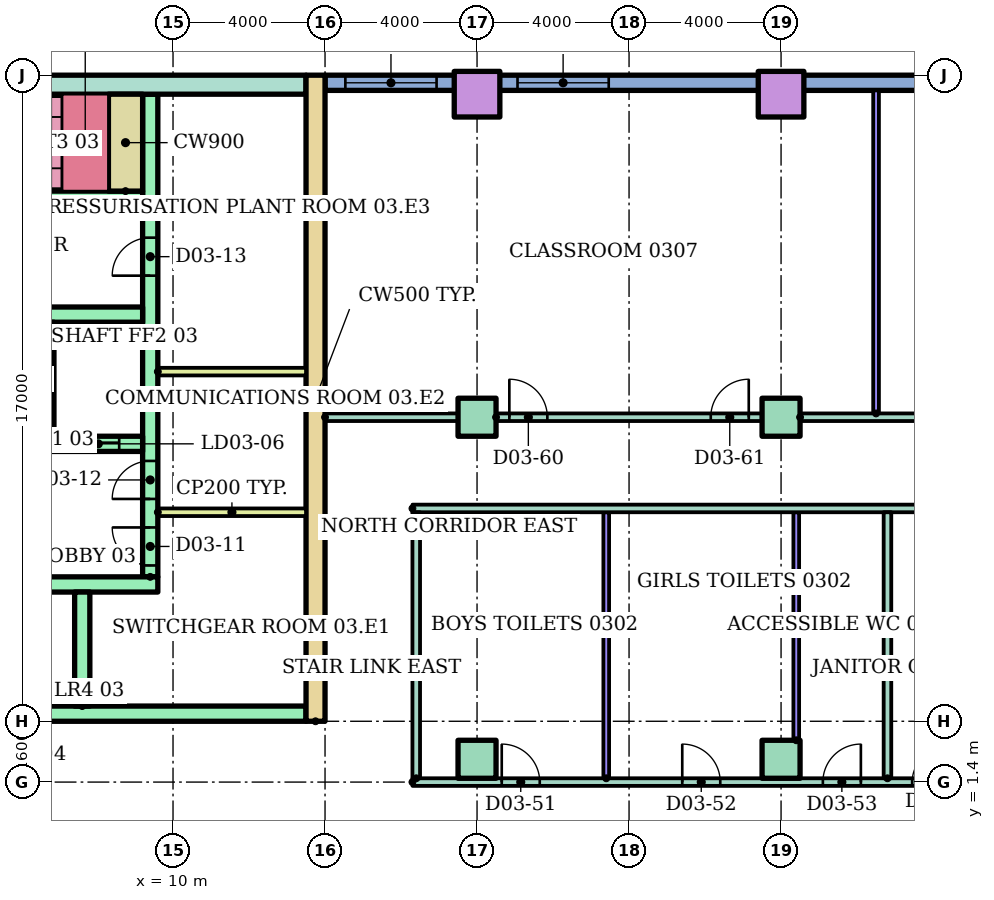
"""IFC4 building model, lengths in metres.
Left out: names, types, materials, properties, quantities, classifications, styles, units other than length and angle.
Written with IfcOpenShell. Run it as: python <this file> out.ifc"""

import sys

from ifc_helpers import new_model, si_unit, direction, frame, frame_2d, origin, origin_2d, place, context, subcontext, project, spatial, rectangle, hollow_rectangle, extrude, element, fill, save


model = new_model("IFC4")
c1 = context("Model", 3, precision=1e-05, world=origin(), true_north=direction((0.0, 1.0)))
c2 = subcontext(c1, "Body", "Model", "MODEL_VIEW")
j1 = project(units=[si_unit("LENGTHUNIT", "METRE"), si_unit("PLANEANGLEUNIT", "RADIAN")], contexts=[c1])
p1 = place(None, origin())
s1 = spatial("IfcSite", under=j1, at=p1, CompositionType="ELEMENT")
p2 = place(p1, origin())
s2 = spatial("IfcBuilding", under=s1, at=p2, CompositionType="ELEMENT")
p3 = place(p2, frame((0.0, 0.0, 14.0)))
s3 = spatial("IfcBuildingStorey", under=s2, at=p3, CompositionType="ELEMENT", Elevation=14.0)
for number, where in (
    (1, (18.0, 2.0, 0.0)),
    (2, (26.0, 2.0, 0.0)),
    (3, (18.0, 11.0, 0.0)),
    (4, (26.0, 11.0, 0.0)),
):
    element("IfcColumn", number, at=place(p3, frame(where)), inside=s3, PredefinedType="COLUMN", context=c2, shape_type="SweptSolid", body=[
        extrude(rectangle(XDim=1.0, YDim=1.0, at=origin_2d()), origin(), (0.0, 0.0, 1.0), 4.0),
    ])
for number, where in (
    (5, (18.0, 19.5, 0.0)),
    (6, (26.0, 19.5, 0.0)),
):
    element("IfcColumn", number, at=place(p3, frame(where)), inside=s3, PredefinedType="COLUMN", context=c2, shape_type="SweptSolid", body=[
        extrude(hollow_rectangle(XDim=1.2, YDim=1.2, WallThickness=0.06, at=origin_2d()), origin(), (0.0, 0.0, 1.0), 4.0),
    ])
p4 = place(p3, frame((39.6, 19.8, 0.0), z_axis=(0.0, 0.0, 1.0), x_axis=(-1.0, 0.0, 0.0)))
e7 = element("IfcWall", 7, at=p4, inside=s3, PredefinedType="STANDARD", context=c2, shape_type="SweptSolid", body=[
    extrude(rectangle(XDim=25.6, YDim=0.4, at=frame_2d((12.8, 0.0))), origin(), (0.0, 0.0, 1.0), 3.7),
])
p5 = place(p4, frame((2.4, 0.0, 0.9)))
e8 = element("IfcOpeningElement", 8, at=p5, cuts=e7, PredefinedType="OPENING", context=c2, shape_type="SweptSolid", body=[
    extrude(rectangle(XDim=2.4, YDim=2.1, at=frame_2d((1.2, 1.05))), frame((0.0, 0.21, 0.0), z_axis=(0.0, -1.0, 0.0), x_axis=(1.0, 0.0, 0.0)), (0.0, 0.0, 1.0), 0.42),
])
p6 = place(p4, frame((18.135, 0.0, 0.9)))
e9 = element("IfcOpeningElement", 9, at=p6, cuts=e7, PredefinedType="OPENING", context=c2, shape_type="SweptSolid", body=[
    extrude(rectangle(XDim=2.4, YDim=2.1, at=frame_2d((1.2, 1.05))), frame((0.0, 0.21, 0.0), z_axis=(0.0, -1.0, 0.0), x_axis=(1.0, 0.0, 0.0)), (0.0, 0.0, 1.0), 0.42),
])
p7 = place(p4, frame((22.665, 0.0, 0.9)))
e10 = element("IfcOpeningElement", 10, at=p7, cuts=e7, PredefinedType="OPENING", context=c2, shape_type="SweptSolid", body=[
    extrude(rectangle(XDim=2.4, YDim=2.1, at=frame_2d((1.2, 1.05))), frame((0.0, 0.21, 0.0), z_axis=(0.0, -1.0, 0.0), x_axis=(1.0, 0.0, 0.0)), (0.0, 0.0, 1.0), 0.42),
])
p8 = place(p3, frame((13.75, 3.0, 0.0), z_axis=(0.0, 0.0, 1.0), x_axis=(0.0, 1.0, 0.0)))
e11 = element("IfcWall", 11, at=p8, inside=s3, PredefinedType="SHEAR", context=c2, shape_type="SweptSolid", body=[
    extrude(rectangle(XDim=17.0, YDim=0.5, at=frame_2d((8.5, 0.0))), origin(), (0.0, 0.0, 1.0), 3.7),
])
p9 = place(p3, frame((-13.5, 19.75, 0.0)))
e12 = element("IfcWall", 12, at=p9, inside=s3, PredefinedType="SHEAR", context=c2, shape_type="SweptSolid", body=[
    extrude(rectangle(XDim=27.0, YDim=0.5, at=frame_2d((13.5, 0.0))), origin(), (0.0, 0.0, 1.0), 3.7),
])
p10 = place(p3, frame((9.4, 6.8, 0.0), z_axis=(0.0, 0.0, 1.0), x_axis=(0.0, 1.0, 0.0)))
e13 = element("IfcWall", 13, at=p10, inside=s3, PredefinedType="SHEAR", context=c2, shape_type="SweptSolid", body=[
    extrude(rectangle(XDim=12.7, YDim=0.4, at=frame_2d((6.35, 0.0))), origin(), (0.0, 0.0, 1.0), 3.7),
])
p11 = place(p10, frame((0.3, 0.0, 0.0)))
e14 = element("IfcOpeningElement", 14, at=p11, cuts=e13, PredefinedType="OPENING", context=c2, shape_type="SweptSolid", body=[
    extrude(rectangle(XDim=1.0, YDim=2.1, at=frame_2d((0.5, 1.05))), frame((0.0, 0.21, 0.0), z_axis=(0.0, -1.0, 0.0), x_axis=(1.0, 0.0, 0.0)), (0.0, 0.0, 1.0), 0.42),
])
p12 = place(p10, frame((2.05, 0.0, 0.0)))
e15 = element("IfcOpeningElement", 15, at=p12, cuts=e13, PredefinedType="OPENING", context=c2, shape_type="SweptSolid", body=[
    extrude(rectangle(XDim=1.0, YDim=2.1, at=frame_2d((0.5, 1.05))), frame((0.0, 0.21, 0.0), z_axis=(0.0, -1.0, 0.0), x_axis=(1.0, 0.0, 0.0)), (0.0, 0.0, 1.0), 0.42),
])
p13 = place(p10, frame((7.925, 0.0, 0.0)))
e16 = element("IfcOpeningElement", 16, at=p13, cuts=e13, PredefinedType="OPENING", context=c2, shape_type="SweptSolid", body=[
    extrude(rectangle(XDim=1.0, YDim=2.1, at=frame_2d((0.5, 1.05))), frame((0.0, 0.21, 0.0), z_axis=(0.0, -1.0, 0.0), x_axis=(1.0, 0.0, 0.0)), (0.0, 0.0, 1.0), 0.42),
])
p14 = place(p3, frame((-13.5, 3.2, 0.0)))
e17 = element("IfcWall", 17, at=p14, inside=s3, PredefinedType="SHEAR", context=c2, shape_type="SweptSolid", body=[
    extrude(rectangle(XDim=27.0, YDim=0.4, at=frame_2d((13.5, 0.0))), origin(), (0.0, 0.0, 1.0), 3.7),
])
p15 = place(p14, frame((6.861, 0.0, 0.0)))
e18 = element("IfcOpeningElement", 18, at=p15, cuts=e17, PredefinedType="OPENING", context=c2, shape_type="SweptSolid", body=[
    extrude(rectangle(XDim=1.1, YDim=2.1, at=frame_2d((0.55, 1.05))), frame((0.0, 0.21, 0.0), z_axis=(0.0, -1.0, 0.0), x_axis=(1.0, 0.0, 0.0)), (0.0, 0.0, 1.0), 0.42),
])
p16 = place(p14, frame((9.906, 0.0, 0.0)))
e19 = element("IfcOpeningElement", 19, at=p16, cuts=e17, PredefinedType="OPENING", context=c2, shape_type="SweptSolid", body=[
    extrude(rectangle(XDim=1.1, YDim=2.1, at=frame_2d((0.55, 1.05))), frame((0.0, 0.21, 0.0), z_axis=(0.0, -1.0, 0.0), x_axis=(1.0, 0.0, 0.0)), (0.0, 0.0, 1.0), 0.42),
])
p17 = place(p14, frame((15.994, 0.0, 0.0)))
e20 = element("IfcOpeningElement", 20, at=p17, cuts=e17, PredefinedType="OPENING", context=c2, shape_type="SweptSolid", body=[
    extrude(rectangle(XDim=1.1, YDim=2.1, at=frame_2d((0.55, 1.05))), frame((0.0, 0.21, 0.0), z_axis=(0.0, -1.0, 0.0), x_axis=(1.0, 0.0, 0.0)), (0.0, 0.0, 1.0), 0.42),
])
p18 = place(p14, frame((19.039, 0.0, 0.0)))
e21 = element("IfcOpeningElement", 21, at=p18, cuts=e17, PredefinedType="OPENING", context=c2, shape_type="SweptSolid", body=[
    extrude(rectangle(XDim=1.1, YDim=2.1, at=frame_2d((0.55, 1.05))), frame((0.0, 0.21, 0.0), z_axis=(0.0, -1.0, 0.0), x_axis=(1.0, 0.0, 0.0)), (0.0, 0.0, 1.0), 0.42),
])
p19 = place(p14, frame((12.6, 0.0, 0.0)))
e22 = element("IfcOpeningElement", 22, at=p19, cuts=e17, PredefinedType="OPENING", context=c2, shape_type="SweptSolid", body=[
    extrude(rectangle(XDim=1.8, YDim=2.1, at=frame_2d((0.9, 1.05))), frame((0.0, 0.21, 0.0), z_axis=(0.0, -1.0, 0.0), x_axis=(1.0, 0.0, 0.0)), (0.0, 0.0, 1.0), 0.42),
])
p20 = place(p3, frame((1.522, 6.6, 0.0)))
e23 = element("IfcWall", 23, at=p20, inside=s3, PredefinedType="SHEAR", context=c2, shape_type="SweptSolid", body=[
    extrude(rectangle(XDim=8.078, YDim=0.4, at=frame_2d((4.039, 0.0))), origin(), (0.0, 0.0, 1.0), 3.7),
])
p21 = place(p3, frame((7.611, 3.4, 0.0), z_axis=(0.0, 0.0, 1.0), x_axis=(0.0, 1.0, 0.0)))
e24 = element("IfcWall", 24, at=p21, inside=s3, PredefinedType="SHEAR", context=c2, shape_type="SweptSolid", body=[
    extrude(rectangle(XDim=3.0, YDim=0.4, at=frame_2d((1.5, 0.0))), origin(), (0.0, 0.0, 1.0), 3.7),
])
p22 = place(p3, frame((1.2, 10.3, 0.0)))
e25 = element("IfcWall", 25, at=p22, inside=s3, PredefinedType="SHEAR", context=c2, shape_type="SweptSolid", body=[
    extrude(rectangle(XDim=8.0, YDim=0.4, at=frame_2d((4.0, 0.0))), origin(), (0.0, 0.0, 1.0), 3.7),
])
p23 = place(p22, frame((3.55, 0.0, 0.0)))
e26 = element("IfcOpeningElement", 26, at=p23, cuts=e25, PredefinedType="OPENING", context=c2, shape_type="SweptSolid", body=[
    extrude(rectangle(XDim=1.1, YDim=2.1, at=frame_2d((0.55, 1.05))), frame((0.0, 0.21, 0.0), z_axis=(0.0, -1.0, 0.0), x_axis=(1.0, 0.0, 0.0)), (0.0, 0.0, 1.0), 0.42),
])
p24 = place(p22, frame((6.283, 0.0, 0.0)))
e27 = element("IfcOpeningElement", 27, at=p24, cuts=e25, PredefinedType="OPENING", context=c2, shape_type="SweptSolid", body=[
    extrude(rectangle(XDim=1.1, YDim=2.1, at=frame_2d((0.55, 1.05))), frame((0.0, 0.21, 0.0), z_axis=(0.0, -1.0, 0.0), x_axis=(1.0, 0.0, 0.0)), (0.0, 0.0, 1.0), 0.42),
])
p25 = place(p22, frame((0.867, 0.0, 0.0)))
e28 = element("IfcOpeningElement", 28, at=p25, cuts=e25, PredefinedType="OPENING", context=c2, shape_type="SweptSolid", body=[
    extrude(rectangle(XDim=1.0, YDim=2.1, at=frame_2d((0.5, 1.05))), frame((0.0, 0.21, 0.0), z_axis=(0.0, -1.0, 0.0), x_axis=(1.0, 0.0, 0.0)), (0.0, 0.0, 1.0), 0.42),
])
p26 = place(p3, frame((1.2, 13.7, 0.0)))
e29 = element("IfcWall", 29, at=p26, inside=s3, PredefinedType="SHEAR", context=c2, shape_type="SweptSolid", body=[
    extrude(rectangle(XDim=8.0, YDim=0.4, at=frame_2d((4.0, 0.0))), origin(), (0.0, 0.0, 1.0), 3.7),
])
p27 = place(p3, frame((6.667, 10.5, 0.0), z_axis=(0.0, 0.0, 1.0), x_axis=(0.0, 1.0, 0.0)))
e30 = element("IfcWall", 30, at=p27, inside=s3, PredefinedType="SHEAR", context=c2, shape_type="SweptSolid", body=[
    extrude(rectangle(XDim=3.0, YDim=0.4, at=frame_2d((1.5, 0.0))), origin(), (0.0, 0.0, 1.0), 3.7),
])
p28 = place(p3, frame((-9.2, 16.75, 0.0)))
e31 = element("IfcWall", 31, at=p28, inside=s3, PredefinedType="SHEAR", context=c2, shape_type="SweptSolid", body=[
    extrude(rectangle(XDim=18.4, YDim=0.4, at=frame_2d((9.2, 0.0))), origin(), (0.0, 0.0, 1.0), 3.7),
])
p29 = place(p28, frame((0.1, 0.0, 0.0)))
e32 = element("IfcOpeningElement", 32, at=p29, cuts=e31, PredefinedType="OPENING", context=c2, shape_type="SweptSolid", body=[
    extrude(rectangle(XDim=0.95, YDim=2.1, at=frame_2d((0.475, 1.05))), frame((0.0, 0.21, 0.0), z_axis=(0.0, -1.0, 0.0), x_axis=(1.0, 0.0, 0.0)), (0.0, 0.0, 1.0), 0.42),
])
p30 = place(p28, frame((6.1, 0.0, 0.0)))
e33 = element("IfcOpeningElement", 33, at=p30, cuts=e31, PredefinedType="OPENING", context=c2, shape_type="SweptSolid", body=[
    extrude(rectangle(XDim=0.95, YDim=2.1, at=frame_2d((0.475, 1.05))), frame((0.0, 0.21, 0.0), z_axis=(0.0, -1.0, 0.0), x_axis=(1.0, 0.0, 0.0)), (0.0, 0.0, 1.0), 0.42),
])
p31 = place(p28, frame((12.1, 0.0, 0.0)))
e34 = element("IfcOpeningElement", 34, at=p31, cuts=e31, PredefinedType="OPENING", context=c2, shape_type="SweptSolid", body=[
    extrude(rectangle(XDim=0.95, YDim=2.1, at=frame_2d((0.475, 1.05))), frame((0.0, 0.21, 0.0), z_axis=(0.0, -1.0, 0.0), x_axis=(1.0, 0.0, 0.0)), (0.0, 0.0, 1.0), 0.42),
])
p32 = place(p3, frame((8.75, 16.95, 0.0), z_axis=(0.0, 0.0, 1.0), x_axis=(0.0, 1.0, 0.0)))
e35 = element("IfcWall", 35, at=p32, inside=s3, PredefinedType="SHEAR", context=c2, shape_type="SweptSolid", body=[
    extrude(rectangle(XDim=2.55, YDim=0.9, at=frame_2d((1.275, 0.0))), origin(), (0.0, 0.0, 1.0), 3.7),
])
for number, where in (
    (36, (9.6, 8.5, 0.0)),
    (37, (9.6, 12.2, 0.0)),
):
    element("IfcWall", number, at=place(p3, frame(where)), inside=s3, PredefinedType="PARTITIONING", context=c2, shape_type="SweptSolid", body=[
        extrude(rectangle(XDim=3.9, YDim=0.2, at=frame_2d((1.95, 0.0))), origin(), (0.0, 0.0, 1.0), 3.7),
    ])
p33 = place(p3, frame((16.3, 1.4, 0.0)))
e38 = element("IfcWall", 38, at=p33, inside=s3, PredefinedType="PARTITIONING", context=c2, shape_type="SweptSolid", body=[
    extrude(rectangle(XDim=20.6, YDim=0.2, at=frame_2d((10.3, 0.0))), origin(), (0.0, 0.0, 1.0), 3.7),
])
p34 = place(p33, frame((2.35, 0.0, 0.0)))
e39 = element("IfcOpeningElement", 39, at=p34, cuts=e38, PredefinedType="OPENING", context=c2, shape_type="SweptSolid", body=[
    extrude(rectangle(XDim=1.0, YDim=2.1, at=frame_2d((0.5, 1.05))), frame((0.0, 0.11, 0.0), z_axis=(0.0, -1.0, 0.0), x_axis=(1.0, 0.0, 0.0)), (0.0, 0.0, 1.0), 0.22),
])
p35 = place(p33, frame((7.1, 0.0, 0.0)))
e40 = element("IfcOpeningElement", 40, at=p35, cuts=e38, PredefinedType="OPENING", context=c2, shape_type="SweptSolid", body=[
    extrude(rectangle(XDim=1.0, YDim=2.1, at=frame_2d((0.5, 1.05))), frame((0.0, 0.11, 0.0), z_axis=(0.0, -1.0, 0.0), x_axis=(1.0, 0.0, 0.0)), (0.0, 0.0, 1.0), 0.22),
])
p36 = place(p33, frame((10.8, 0.0, 0.0)))
e41 = element("IfcOpeningElement", 41, at=p36, cuts=e38, PredefinedType="OPENING", context=c2, shape_type="SweptSolid", body=[
    extrude(rectangle(XDim=1.0, YDim=2.1, at=frame_2d((0.5, 1.05))), frame((0.0, 0.11, 0.0), z_axis=(0.0, -1.0, 0.0), x_axis=(1.0, 0.0, 0.0)), (0.0, 0.0, 1.0), 0.22),
])
p37 = place(p33, frame((13.15, 0.0, 0.0)))
e42 = element("IfcOpeningElement", 42, at=p37, cuts=e38, PredefinedType="OPENING", context=c2, shape_type="SweptSolid", body=[
    extrude(rectangle(XDim=0.9, YDim=2.1, at=frame_2d((0.45, 1.05))), frame((0.0, 0.11, 0.0), z_axis=(0.0, -1.0, 0.0), x_axis=(1.0, 0.0, 0.0)), (0.0, 0.0, 1.0), 0.22),
])
p38 = place(p3, frame((16.3, 8.6, 0.0)))
e43 = element("IfcWall", 43, at=p38, inside=s3, PredefinedType="PARTITIONING", context=c2, shape_type="SweptSolid", body=[
    extrude(rectangle(XDim=21.3, YDim=0.2, at=frame_2d((10.65, 0.0))), origin(), (0.0, 0.0, 1.0), 3.7),
])
p39 = place(p3, frame((14.0, 11.0, 0.0)))
e44 = element("IfcWall", 44, at=p39, inside=s3, PredefinedType="PARTITIONING", context=c2, shape_type="SweptSolid", body=[
    extrude(rectangle(XDim=3.5, YDim=0.2, at=frame_2d((1.75, 0.0))), origin(), (0.0, 0.0, 1.0), 3.7),
])
p40 = place(p3, frame((18.5, 11.0, 0.0)))
e45 = element("IfcWall", 45, at=p40, inside=s3, PredefinedType="PARTITIONING", context=c2, shape_type="SweptSolid", body=[
    extrude(rectangle(XDim=7.0, YDim=0.2, at=frame_2d((3.5, 0.0))), origin(), (0.0, 0.0, 1.0), 3.7),
])
p41 = place(p40, frame((0.35, 0.0, 0.0)))
e46 = element("IfcOpeningElement", 46, at=p41, cuts=e45, PredefinedType="OPENING", context=c2, shape_type="SweptSolid", body=[
    extrude(rectangle(XDim=1.0, YDim=2.1, at=frame_2d((0.5, 1.05))), frame((0.0, 0.11, 0.0), z_axis=(0.0, -1.0, 0.0), x_axis=(1.0, 0.0, 0.0)), (0.0, 0.0, 1.0), 0.22),
])
p42 = place(p40, frame((5.65, 0.0, 0.0)))
e47 = element("IfcOpeningElement", 47, at=p42, cuts=e45, PredefinedType="OPENING", context=c2, shape_type="SweptSolid", body=[
    extrude(rectangle(XDim=1.0, YDim=2.1, at=frame_2d((0.5, 1.05))), frame((0.0, 0.11, 0.0), z_axis=(0.0, -1.0, 0.0), x_axis=(1.0, 0.0, 0.0)), (0.0, 0.0, 1.0), 0.22),
])
p43 = place(p3, frame((26.5, 11.0, 0.0)))
e48 = element("IfcWall", 48, at=p43, inside=s3, PredefinedType="PARTITIONING", context=c2, shape_type="SweptSolid", body=[
    extrude(rectangle(XDim=7.0, YDim=0.2, at=frame_2d((3.5, 0.0))), origin(), (0.0, 0.0, 1.0), 3.7),
])
p44 = place(p43, frame((3.502, 0.0, 0.0)))
e49 = element("IfcOpeningElement", 49, at=p44, cuts=e48, PredefinedType="OPENING", context=c2, shape_type="SweptSolid", body=[
    extrude(rectangle(XDim=1.0, YDim=2.1, at=frame_2d((0.5, 1.05))), frame((0.0, 0.11, 0.0), z_axis=(0.0, -1.0, 0.0), x_axis=(1.0, 0.0, 0.0)), (0.0, 0.0, 1.0), 0.22),
])
p45 = place(p43, frame((5.65, 0.0, 0.0)))
e50 = element("IfcOpeningElement", 50, at=p45, cuts=e48, PredefinedType="OPENING", context=c2, shape_type="SweptSolid", body=[
    extrude(rectangle(XDim=1.0, YDim=2.1, at=frame_2d((0.5, 1.05))), frame((0.0, 0.11, 0.0), z_axis=(0.0, -1.0, 0.0), x_axis=(1.0, 0.0, 0.0)), (0.0, 0.0, 1.0), 0.22),
])
p46 = place(p3, frame((16.4, 1.5, 0.0), z_axis=(0.0, 0.0, 1.0), x_axis=(0.0, 1.0, 0.0)))
e51 = element("IfcWall", 51, at=p46, inside=s3, PredefinedType="PARTITIONING", context=c2, shape_type="SweptSolid", body=[
    extrude(rectangle(XDim=7.0, YDim=0.2, at=frame_2d((3.5, 0.0))), origin(), (0.0, 0.0, 1.0), 3.7),
])
p47 = place(p3, frame((21.4, 1.5, 0.0), z_axis=(0.0, 0.0, 1.0), x_axis=(0.0, 1.0, 0.0)))
e52 = element("IfcWall", 52, at=p47, inside=s3, PredefinedType="PARTITIONING", context=c2, shape_type="SweptSolid", body=[
    extrude(rectangle(XDim=7.0, YDim=0.15, at=frame_2d((3.5, 0.0))), origin(), (0.0, 0.0, 1.0), 3.7),
])
p48 = place(p3, frame((26.4, 2.5, 0.0), z_axis=(0.0, 0.0, 1.0), x_axis=(0.0, 1.0, 0.0)))
e53 = element("IfcWall", 53, at=p48, inside=s3, PredefinedType="PARTITIONING", context=c2, shape_type="SweptSolid", body=[
    extrude(rectangle(XDim=6.0, YDim=0.15, at=frame_2d((3.0, 0.0))), origin(), (0.0, 0.0, 1.0), 3.7),
])
p49 = place(p3, frame((28.5, 11.1, 0.0), z_axis=(0.0, 0.0, 1.0), x_axis=(0.0, 1.0, 0.0)))
e54 = element("IfcWall", 54, at=p49, inside=s3, PredefinedType="PARTITIONING", context=c2, shape_type="SweptSolid", body=[
    extrude(rectangle(XDim=8.5, YDim=0.15, at=frame_2d((4.25, 0.0))), origin(), (0.0, 0.0, 1.0), 3.7),
])
p50 = place(p3, frame((28.8, 1.5, 0.0), z_axis=(0.0, 0.0, 1.0), x_axis=(0.0, 1.0, 0.0)))
e55 = element("IfcWall", 55, at=p50, inside=s3, PredefinedType="PARTITIONING", context=c2, shape_type="SweptSolid", body=[
    extrude(rectangle(XDim=7.0, YDim=0.2, at=frame_2d((3.5, 0.0))), origin(), (0.0, 0.0, 1.0), 3.7),
])
p51 = place(p6, origin())
e56 = element("IfcWindow", 56, at=p51, inside=s3, PartitioningType="SINGLE_PANEL", PredefinedType="WINDOW", context=c2, shape_type="SweptSolid", body=[
    extrude(rectangle(XDim=2.4, YDim=2.1, at=frame_2d((1.2, 1.05))), frame((0.0, 0.03, 0.0), z_axis=(0.0, -1.0, 0.0), x_axis=(1.0, 0.0, 0.0)), (0.0, 0.0, 1.0), 0.06),
])
fill(e9, e56)
p52 = place(p7, origin())
e57 = element("IfcWindow", 57, at=p52, inside=s3, PartitioningType="SINGLE_PANEL", PredefinedType="WINDOW", context=c2, shape_type="SweptSolid", body=[
    extrude(rectangle(XDim=2.4, YDim=2.1, at=frame_2d((1.2, 1.05))), frame((0.0, 0.03, 0.0), z_axis=(0.0, -1.0, 0.0), x_axis=(1.0, 0.0, 0.0)), (0.0, 0.0, 1.0), 0.06),
])
fill(e10, e57)
p53 = place(p24, origin())
e58 = element("IfcDoor", 58, at=p53, inside=s3, OperationType="SLIDING_TO_LEFT", PredefinedType="DOOR", context=c2, shape_type="SweptSolid", body=[
    extrude(rectangle(XDim=1.1, YDim=2.1, at=frame_2d((0.55, 1.05))), frame((0.0, 0.025, 0.0), z_axis=(0.0, -1.0, 0.0), x_axis=(1.0, 0.0, 0.0)), (0.0, 0.0, 1.0), 0.05),
])
fill(e27, e58)
p54 = place(p11, origin())
e59 = element("IfcDoor", 59, at=p54, inside=s3, OperationType="SINGLE_SWING_RIGHT", PredefinedType="DOOR", context=c2, shape_type="SweptSolid", body=[
    extrude(rectangle(XDim=1.0, YDim=2.1, at=frame_2d((0.5, 1.05))), frame((0.0, 0.025, 0.0), z_axis=(0.0, -1.0, 0.0), x_axis=(1.0, 0.0, 0.0)), (0.0, 0.0, 1.0), 0.05),
])
fill(e14, e59)
p55 = place(p12, origin())
e60 = element("IfcDoor", 60, at=p55, inside=s3, OperationType="SINGLE_SWING_LEFT", PredefinedType="DOOR", context=c2, shape_type="SweptSolid", body=[
    extrude(rectangle(XDim=1.0, YDim=2.1, at=frame_2d((0.5, 1.05))), frame((0.0, 0.025, 0.0), z_axis=(0.0, -1.0, 0.0), x_axis=(1.0, 0.0, 0.0)), (0.0, 0.0, 1.0), 0.05),
])
fill(e15, e60)
p56 = place(p13, origin())
e61 = element("IfcDoor", 61, at=p56, inside=s3, OperationType="SINGLE_SWING_LEFT", PredefinedType="DOOR", context=c2, shape_type="SweptSolid", body=[
    extrude(rectangle(XDim=1.0, YDim=2.1, at=frame_2d((0.5, 1.05))), frame((0.0, 0.025, 0.0), z_axis=(0.0, -1.0, 0.0), x_axis=(1.0, 0.0, 0.0)), (0.0, 0.0, 1.0), 0.05),
])
fill(e16, e61)
p57 = place(p34, origin())
e62 = element("IfcDoor", 62, at=p57, inside=s3, OperationType="SINGLE_SWING_LEFT", PredefinedType="DOOR", context=c2, shape_type="SweptSolid", body=[
    extrude(rectangle(XDim=1.0, YDim=2.1, at=frame_2d((0.5, 1.05))), frame((0.0, 0.025, 0.0), z_axis=(0.0, -1.0, 0.0), x_axis=(1.0, 0.0, 0.0)), (0.0, 0.0, 1.0), 0.05),
])
fill(e39, e62)
p58 = place(p35, origin())
e63 = element("IfcDoor", 63, at=p58, inside=s3, OperationType="SINGLE_SWING_LEFT", PredefinedType="DOOR", context=c2, shape_type="SweptSolid", body=[
    extrude(rectangle(XDim=1.0, YDim=2.1, at=frame_2d((0.5, 1.05))), frame((0.0, 0.025, 0.0), z_axis=(0.0, -1.0, 0.0), x_axis=(1.0, 0.0, 0.0)), (0.0, 0.0, 1.0), 0.05),
])
fill(e40, e63)
p59 = place(p36, origin())
e64 = element("IfcDoor", 64, at=p59, inside=s3, OperationType="SINGLE_SWING_RIGHT", PredefinedType="DOOR", context=c2, shape_type="SweptSolid", body=[
    extrude(rectangle(XDim=1.0, YDim=2.1, at=frame_2d((0.5, 1.05))), frame((0.0, 0.025, 0.0), z_axis=(0.0, -1.0, 0.0), x_axis=(1.0, 0.0, 0.0)), (0.0, 0.0, 1.0), 0.05),
])
fill(e41, e64)
p60 = place(p37, origin())
e65 = element("IfcDoor", 65, at=p60, inside=s3, OperationType="SINGLE_SWING_RIGHT", PredefinedType="DOOR", context=c2, shape_type="SweptSolid", body=[
    extrude(rectangle(XDim=0.9, YDim=2.1, at=frame_2d((0.45, 1.05))), frame((0.0, 0.025, 0.0), z_axis=(0.0, -1.0, 0.0), x_axis=(1.0, 0.0, 0.0)), (0.0, 0.0, 1.0), 0.05),
])
fill(e42, e65)
p61 = place(p41, origin())
e66 = element("IfcDoor", 66, at=p61, inside=s3, OperationType="SINGLE_SWING_LEFT", PredefinedType="DOOR", context=c2, shape_type="SweptSolid", body=[
    extrude(rectangle(XDim=1.0, YDim=2.1, at=frame_2d((0.5, 1.05))), frame((0.0, 0.025, 0.0), z_axis=(0.0, -1.0, 0.0), x_axis=(1.0, 0.0, 0.0)), (0.0, 0.0, 1.0), 0.05),
])
fill(e46, e66)
p62 = place(p42, origin())
e67 = element("IfcDoor", 67, at=p62, inside=s3, OperationType="SINGLE_SWING_RIGHT", PredefinedType="DOOR", context=c2, shape_type="SweptSolid", body=[
    extrude(rectangle(XDim=1.0, YDim=2.1, at=frame_2d((0.5, 1.05))), frame((0.0, 0.025, 0.0), z_axis=(0.0, -1.0, 0.0), x_axis=(1.0, 0.0, 0.0)), (0.0, 0.0, 1.0), 0.05),
])
fill(e47, e67)
save(model, sys.argv[1])
